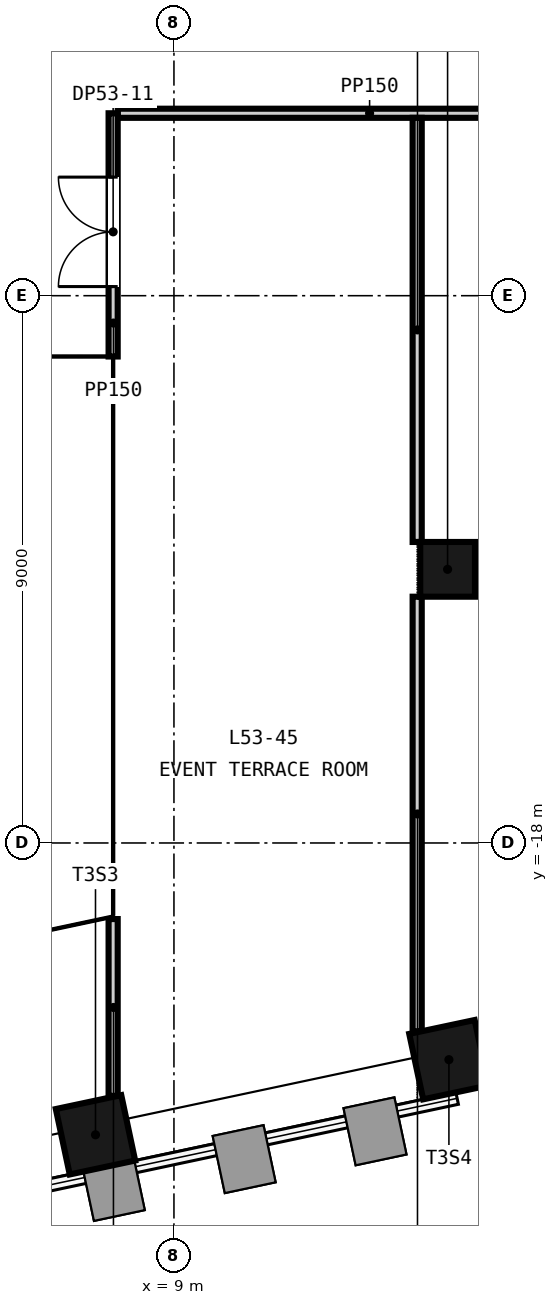
"""IFC4 building model, lengths in metres.
Left out: names, types, materials, properties, quantities, classifications, styles, units other than length and angle.
Written with IfcOpenShell. Run it as: python <this file> out.ifc"""

import sys

from ifc_helpers import new_model, si_unit, direction, frame, frame_2d, origin, origin_2d, place, context, subcontext, project, spatial, rectangle, extrude, element, fill, save


model = new_model("IFC4")
c1 = context("Model", 3, precision=1e-05, world=origin(), true_north=direction((0.0, 1.0)))
c2 = subcontext(c1, "Body", "Model", "MODEL_VIEW")
j1 = project(units=[si_unit("LENGTHUNIT", "METRE"), si_unit("PLANEANGLEUNIT", "RADIAN")], contexts=[c1])
p1 = place(None, origin())
s1 = spatial("IfcSite", under=j1, at=p1, CompositionType="ELEMENT")
p2 = place(p1, origin())
s2 = spatial("IfcBuilding", under=s1, at=p2, CompositionType="ELEMENT")
p3 = place(p2, frame((0.0, 0.0, 211.8)))
s3 = spatial("IfcBuildingStorey", under=s2, at=p3, CompositionType="ELEMENT", Elevation=211.8)
for number, where, z_axis, x_axis in (
    (1, (7.71, -22.799, -0.3), (0.0, 0.0, 1.0), (0.978, 0.208, 0.0)),
    (2, (13.522, -21.563, -0.3), (0.0, 0.0, 1.0), (0.978, 0.208, 0.0)),
):
    element("IfcColumn", number, at=place(p3, frame(where, z_axis=z_axis, x_axis=x_axis)), inside=s3, PredefinedType="COLUMN", context=c2, shape_type="SweptSolid", body=[
        extrude(rectangle(XDim=1.1, YDim=1.1, at=origin_2d()), origin(), (0.0, 0.0, 1.0), 4.65),
    ])
p4 = place(p3, frame((13.5, -13.5, -0.3), z_axis=(0.0, 0.0, 1.0), x_axis=(1.0, 0.0, 0.0)))
e3 = element("IfcColumn", 3, at=p4, inside=s3, PredefinedType="COLUMN", context=c2, shape_type="SweptSolid", body=[
    extrude(rectangle(XDim=0.9, YDim=0.9, at=origin_2d()), origin(), (0.0, 0.0, 1.0), 4.65),
])
p5 = place(p3, frame((8.075, -6.0, 0.0), z_axis=(0.0, 0.0, 1.0), x_axis=(1.0, 0.0, 0.0)))
e4 = element("IfcWall", 4, at=p5, inside=s3, PredefinedType="PARTITIONING", context=c2, shape_type="SweptSolid", body=[
    extrude(rectangle(XDim=16.415, YDim=0.15, at=frame_2d((8.208, 0.0))), origin(), (0.0, 0.0, 1.0), 4.35),
])
p6 = place(p5, frame((8.325, 0.0, 0.0)))
e5 = element("IfcOpeningElement", 5, at=p6, cuts=e4, PredefinedType="OPENING", context=c2, shape_type="SweptSolid", body=[
    extrude(rectangle(XDim=1.0, YDim=2.1, at=frame_2d((0.5, 1.05))), frame((0.0, 0.085, 0.0), z_axis=(0.0, -1.0, 0.0), x_axis=(1.0, 0.0, 0.0)), (0.0, 0.0, 1.0), 0.17),
])
p7 = place(p3, frame((8.0, -22.159, 0.0), z_axis=(0.0, 0.0, 1.0), x_axis=(0.0, 1.0, 0.0)))
e6 = element("IfcWall", 6, at=p7, inside=s3, PredefinedType="PARTITIONING", context=c2, shape_type="SweptSolid", body=[
    extrude(rectangle(XDim=2.908, YDim=0.15, at=frame_2d((1.454, 0.0))), origin(), (0.0, 0.0, 1.0), 3.744),
])
p8 = place(p3, frame((8.0, -10.0, 0.0), z_axis=(0.0, 0.0, 1.0), x_axis=(0.0, 1.0, 0.0)))
e7 = element("IfcWall", 7, at=p8, inside=s3, PredefinedType="PARTITIONING", context=c2, shape_type="SweptSolid", body=[
    extrude(rectangle(XDim=4.0, YDim=0.15, at=frame_2d((2.0, 0.0))), origin(), (0.0, 0.0, 1.0), 3.744),
])
p9 = place(p8, frame((1.15, 0.0, 0.0)))
e8 = element("IfcOpeningElement", 8, at=p9, cuts=e7, PredefinedType="OPENING", context=c2, shape_type="SweptSolid", body=[
    extrude(rectangle(XDim=1.8, YDim=2.4, at=frame_2d((0.9, 1.2))), frame((0.0, 0.085, 0.0), z_axis=(0.0, -1.0, 0.0), x_axis=(1.0, 0.0, 0.0)), (0.0, 0.0, 1.0), 0.17),
])
p10 = place(p3, frame((13.0, -21.096, 0.0), z_axis=(0.0, 0.0, 1.0), x_axis=(0.0, 1.0, 0.0)))
e9 = element("IfcWall", 9, at=p10, inside=s3, PredefinedType="PARTITIONING", context=c2, shape_type="SweptSolid", body=[
    extrude(rectangle(XDim=7.146, YDim=0.15, at=frame_2d((3.573, 0.0))), origin(), (0.0, 0.0, 1.0), 4.35),
])
p11 = place(p3, frame((13.0, -13.05, 0.0), z_axis=(0.0, 0.0, 1.0), x_axis=(0.0, 1.0, 0.0)))
e10 = element("IfcWall", 10, at=p11, inside=s3, PredefinedType="PARTITIONING", context=c2, shape_type="SweptSolid", body=[
    extrude(rectangle(XDim=6.975, YDim=0.15, at=frame_2d((3.488, 0.0))), origin(), (0.0, 0.0, 1.0), 4.35),
])
p12 = place(p9, origin())
e11 = element("IfcDoor", 11, at=p12, inside=s3, OperationType="SINGLE_SWING_LEFT", PredefinedType="DOOR", context=c2, shape_type="SweptSolid", body=[
    extrude(rectangle(XDim=1.8, YDim=2.4, at=frame_2d((0.9, 1.2))), frame((0.0, 0.025, 0.0), z_axis=(0.0, -1.0, 0.0), x_axis=(1.0, 0.0, 0.0)), (0.0, 0.0, 1.0), 0.05),
])
fill(e8, e11)
save(model, sys.argv[1])
